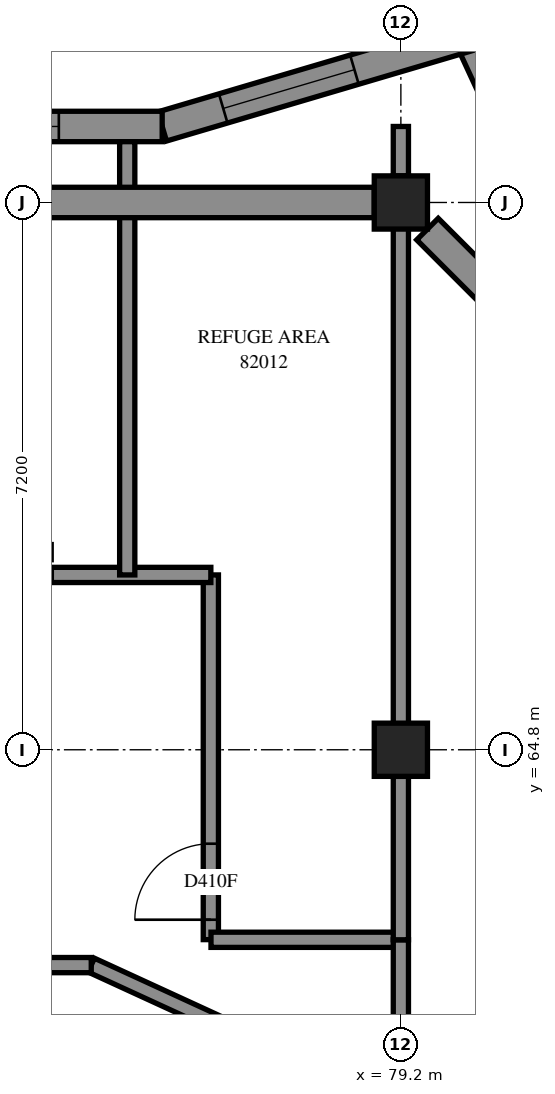
"""IFC4 building model, lengths in metres.
Left out: names, types, materials, properties, quantities, classifications, styles, units other than length and angle.
Written with IfcOpenShell. Run it as: python <this file> out.ifc"""

import sys

from ifc_helpers import new_model, si_unit, direction, frame, frame_2d, origin, origin_2d, place, context, subcontext, project, spatial, polyline, rectangle, outline, extrude, element, fill, save


model = new_model("IFC4")
c1 = context("Model", 3, precision=1e-05, world=origin(), true_north=direction((0.0, 1.0)))
c2 = subcontext(c1, "Body", "Model", "MODEL_VIEW")
j1 = project(units=[si_unit("LENGTHUNIT", "METRE"), si_unit("PLANEANGLEUNIT", "RADIAN")], contexts=[c1])
p1 = place(None, origin())
s1 = spatial("IfcSite", under=j1, at=p1, CompositionType="ELEMENT")
p2 = place(p1, origin())
s2 = spatial("IfcBuilding", under=s1, at=p2, CompositionType="ELEMENT")
p3 = place(p2, frame((0.0, 0.0, 302.0)))
s3 = spatial("IfcBuildingStorey", under=s2, at=p3, CompositionType="ELEMENT", Elevation=302.0)
for number, where, z_axis, x_axis in (
    (1, (79.2, 64.8, 0.0), (0.0, 0.0, 1.0), (1.0, 0.0, 0.0)),
    (2, (79.2, 72.0, 0.0), (0.0, 0.0, 1.0), (1.0, 0.0, 0.0)),
):
    element("IfcColumn", number, at=place(p3, frame(where, z_axis=z_axis, x_axis=x_axis)), inside=s3, PredefinedType="COLUMN", context=c2, shape_type="SweptSolid", body=[
        extrude(rectangle(XDim=0.7, YDim=0.7, at=origin_2d()), origin(), (0.0, 0.0, 1.0), 3.5),
    ])
p4 = place(p3, frame((81.53, 71.085, 0.0), z_axis=(0.0, 0.0, 1.0), x_axis=(-0.4192693569, 0.9078618873, 0.0)))
e3 = element("IfcWall", 3, at=p4, inside=s3, PredefinedType="SOLIDWALL", context=c2, shape_type="SweptSolid", body=[
    extrude(outline(polyline([(0.036, -0.2), (3.596, -0.2), (3.25, 0.2), (-0.036, 0.2), (0.036, -0.2)])), origin(), (0.0, 0.0, 1.0), 3.5),
])
p5 = place(p4, frame((0.423, 0.0, 0.7)))
e4 = element("IfcOpeningElement", 4, at=p5, cuts=e3, PredefinedType="OPENING", context=c2, shape_type="SweptSolid", body=[
    extrude(rectangle(XDim=1.8, YDim=2.2, at=frame_2d((0.9, 1.1))), frame((0.0, 0.21, 0.0), z_axis=(0.0, -1.0, 0.0), x_axis=(1.0, 0.0, 0.0)), (0.0, 0.0, 1.0), 0.42),
])
p6 = place(p3, frame((80.094, 74.192, 0.0), z_axis=(0.0, 0.0, 1.0), x_axis=(-0.9590112491, -0.2833680012, 0.0)))
e5 = element("IfcWall", 5, at=p6, inside=s3, PredefinedType="SOLIDWALL", context=c2, shape_type="SweptSolid", body=[
    extrude(outline(polyline([(-0.173, -0.2), (4.178, -0.2), (4.236, 0.2), (0.173, 0.2), (-0.173, -0.2)])), origin(), (0.0, 0.0, 1.0), 3.5),
])
p7 = place(p6, frame((1.57, 0.0, 0.7)))
e6 = element("IfcOpeningElement", 6, at=p7, cuts=e5, PredefinedType="OPENING", context=c2, shape_type="SweptSolid", body=[
    extrude(rectangle(XDim=1.8, YDim=2.2, at=frame_2d((0.9, 1.1))), frame((0.0, 0.21, 0.0), z_axis=(0.0, -1.0, 0.0), x_axis=(1.0, 0.0, 0.0)), (0.0, 0.0, 1.0), 0.42),
])
p8 = place(p3, frame((76.06, 73.0, 0.0), z_axis=(0.0, 0.0, 1.0), x_axis=(-1.0, 0.0, 0.0)))
e7 = element("IfcWall", 7, at=p8, inside=s3, PredefinedType="SOLIDWALL", context=c2, shape_type="SweptSolid", body=[
    extrude(outline(polyline([(0.029, -0.2), (8.374, -0.2), (8.374, 0.2), (-0.029, 0.2), (0.029, -0.2)])), origin(), (0.0, 0.0, 1.0), 3.0),
])
p9 = place(p8, frame((1.36, 0.0, 0.7)))
e8 = element("IfcOpeningElement", 8, at=p9, cuts=e7, PredefinedType="OPENING", context=c2, shape_type="SweptSolid", body=[
    extrude(rectangle(XDim=1.8, YDim=2.2, at=frame_2d((0.9, 1.1))), frame((0.0, 0.21, 0.0), z_axis=(0.0, -1.0, 0.0), x_axis=(1.0, 0.0, 0.0)), (0.0, 0.0, 1.0), 0.42),
])
p10 = place(p8, frame((4.96, 0.0, 0.7)))
e9 = element("IfcOpeningElement", 9, at=p10, cuts=e7, PredefinedType="OPENING", context=c2, shape_type="SweptSolid", body=[
    extrude(rectangle(XDim=1.8, YDim=2.2, at=frame_2d((0.9, 1.1))), frame((0.0, 0.21, 0.0), z_axis=(0.0, -1.0, 0.0), x_axis=(1.0, 0.0, 0.0)), (0.0, 0.0, 1.0), 0.42),
])
p11 = place(p3, frame((78.2, 60.555, 0.0), z_axis=(0.0, 0.0, 1.0), x_axis=(-0.9086892736, 0.4174731177, 0.0)))
e10 = element("IfcWall", 10, at=p11, inside=s3, PredefinedType="PARAPET", context=c2, shape_type="SweptSolid", body=[
    extrude(outline(polyline([(-0.018, -0.1), (3.404, -0.1), (3.36, 0.1), (0.018, 0.1), (-0.018, -0.1)])), origin(), (0.0, 0.0, 1.0), 0.25),
])
p12 = place(p3, frame((79.2, 64.45, 0.0), z_axis=(0.0, 0.0, 1.0), x_axis=(0.0, 1.0, 0.0)))
e11 = element("IfcWall", 11, at=p12, inside=s3, PredefinedType="PARTITIONING", context=c2, shape_type="SweptSolid", body=[
    extrude(rectangle(XDim=7.9, YDim=0.2, at=frame_2d((3.95, 0.0))), origin(), (0.0, 0.0, 1.0), 3.5),
])
p13 = place(p3, frame((76.7, 62.302, 0.0), z_axis=(0.0, 0.0, 1.0), x_axis=(0.0, 1.0, 0.0)))
e12 = element("IfcWall", 12, at=p13, inside=s3, PredefinedType="PARTITIONING", context=c2, shape_type="SweptSolid", body=[
    extrude(rectangle(XDim=4.798, YDim=0.2, at=frame_2d((2.399, 0.0))), origin(), (0.0, 0.0, 1.0), 3.5),
])
p14 = place(p13, frame((0.262, 0.0, 0.0)))
e13 = element("IfcOpeningElement", 13, at=p14, cuts=e12, PredefinedType="OPENING", context=c2, shape_type="SweptSolid", body=[
    extrude(rectangle(XDim=1.0, YDim=2.1, at=frame_2d((0.5, 1.05))), frame((0.0, 0.11, 0.0), z_axis=(0.0, -1.0, 0.0), x_axis=(1.0, 0.0, 0.0)), (0.0, 0.0, 1.0), 0.22),
])
p15 = place(p3, frame((76.702, 62.3, 0.0), z_axis=(0.0, 0.0, 1.0), x_axis=(1.0, 0.0, 0.0)))
e14 = element("IfcWall", 14, at=p15, inside=s3, PredefinedType="PARTITIONING", context=c2, shape_type="SweptSolid", body=[
    extrude(rectangle(XDim=2.498, YDim=0.2, at=frame_2d((1.249, 0.0))), origin(), (0.0, 0.0, 1.0), 3.5),
])
p16 = place(p3, frame((79.2, 60.1, 0.0), z_axis=(0.0, 0.0, 1.0), x_axis=(0.0, 1.0, 0.0)))
e15 = element("IfcWall", 15, at=p16, inside=s3, PredefinedType="PARTITIONING", context=c2, shape_type="SweptSolid", body=[
    extrude(rectangle(XDim=2.2, YDim=0.2, at=frame_2d((1.1, 0.0))), origin(), (0.0, 0.0, 1.0), 3.5),
])
p17 = place(p3, frame((79.2, 62.3, 0.0), z_axis=(0.0, 0.0, 1.0), x_axis=(0.0, 1.0, 0.0)))
e16 = element("IfcWall", 16, at=p17, inside=s3, PredefinedType="PARTITIONING", context=c2, shape_type="SweptSolid", body=[
    extrude(rectangle(XDim=2.15, YDim=0.2, at=frame_2d((1.075, 0.0))), origin(), (0.0, 0.0, 1.0), 3.5),
])
p18 = place(p3, frame((74.602, 67.1, 0.0), z_axis=(0.0, 0.0, 1.0), x_axis=(1.0, 0.0, 0.0)))
e17 = element("IfcWall", 17, at=p18, inside=s3, PredefinedType="PARTITIONING", context=c2, shape_type="SweptSolid", body=[
    extrude(rectangle(XDim=2.098, YDim=0.2, at=frame_2d((1.049, 0.0))), origin(), (0.0, 0.0, 1.0), 3.5),
])
p19 = place(p3, frame((79.2, 72.35, 0.0), z_axis=(0.0, 0.0, 1.0), x_axis=(0.0, 1.0, 0.0)))
e18 = element("IfcWall", 18, at=p19, inside=s3, PredefinedType="PARTITIONING", context=c2, shape_type="SweptSolid", body=[
    extrude(rectangle(XDim=0.65, YDim=0.2, at=frame_2d((0.325, 0.0))), origin(), (0.0, 0.0, 1.0), 3.5),
])
p20 = place(p3, frame((75.127, 61.967, 0.0), z_axis=(0.0, 0.0, 1.0), x_axis=(-1.0, 0.0, 0.0)))
e19 = element("IfcWall", 19, at=p20, inside=s3, PredefinedType="PARAPET", context=c2, shape_type="SweptSolid", body=[
    extrude(outline(polyline([(-0.022, -0.1), (1.807, -0.1), (1.807, 0.1), (0.022, 0.1), (-0.022, -0.1)])), origin(), (0.0, 0.0, 1.0), 0.25),
])
p21 = place(p3, frame((75.6, 67.1, 0.0), z_axis=(0.0, 0.0, 1.0), x_axis=(0.0, 1.0, 0.0)))
e20 = element("IfcWall", 20, at=p21, inside=s3, PredefinedType="PARTITIONING", context=c2, shape_type="SweptSolid", body=[
    extrude(outline(polyline([(0.0, -0.1), (5.7, -0.1), (5.7, 0.1), (0.0, 0.1), (0.0, -0.1)])), origin(), (0.0, 0.0, 1.0), 3.5),
])
p22 = place(p7, origin())
e21 = element("IfcWindow", 21, at=p22, inside=s3, PartitioningType="SINGLE_PANEL", PredefinedType="WINDOW", context=c2, shape_type="SweptSolid", body=[
    extrude(rectangle(XDim=1.8, YDim=2.2, at=frame_2d((0.9, 1.1))), frame((0.0, 0.08, 0.0), z_axis=(0.0, -1.0, 0.0), x_axis=(1.0, 0.0, 0.0)), (0.0, 0.0, 1.0), 0.06),
])
fill(e6, e21)
p23 = place(p9, origin())
e22 = element("IfcWindow", 22, at=p23, inside=s3, PartitioningType="SINGLE_PANEL", PredefinedType="WINDOW", context=c2, shape_type="SweptSolid", body=[
    extrude(rectangle(XDim=1.8, YDim=2.2, at=frame_2d((0.9, 1.1))), frame((0.0, 0.08, 0.0), z_axis=(0.0, -1.0, 0.0), x_axis=(1.0, 0.0, 0.0)), (0.0, 0.0, 1.0), 0.06),
])
fill(e8, e22)
p24 = place(p14, origin())
e23 = element("IfcDoor", 23, at=p24, inside=s3, OperationType="SINGLE_SWING_LEFT", PredefinedType="DOOR", context=c2, shape_type="SweptSolid", body=[
    extrude(rectangle(XDim=1.0, YDim=2.1, at=frame_2d((0.5, 1.05))), frame((0.0, 0.025, 0.0), z_axis=(0.0, -1.0, 0.0), x_axis=(1.0, 0.0, 0.0)), (0.0, 0.0, 1.0), 0.05),
])
fill(e13, e23)
save(model, sys.argv[1])
